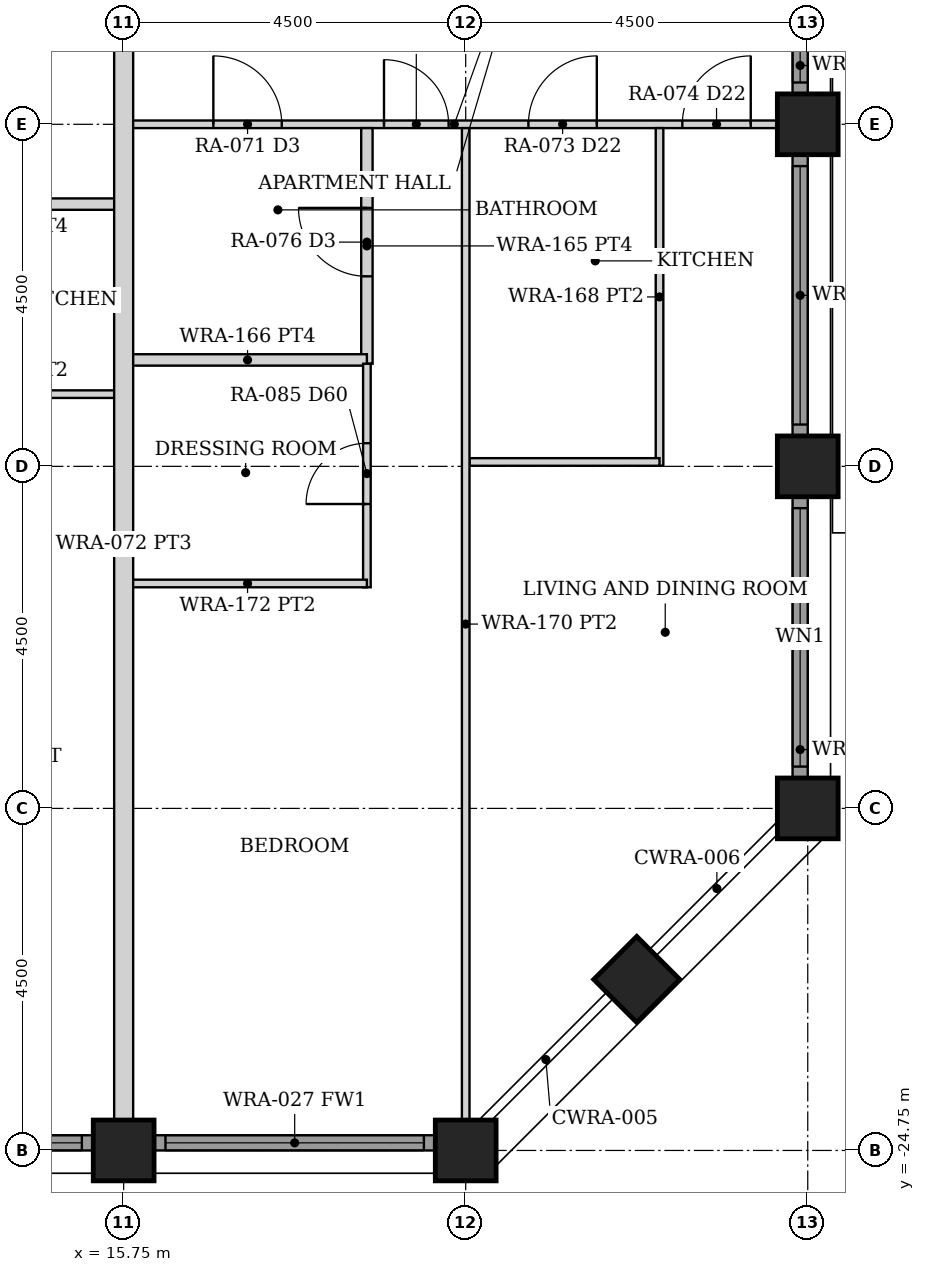
"""IFC4 building model, lengths in metres.
Left out: names, types, materials, properties, quantities, classifications, styles, units other than length and angle.
Written with IfcOpenShell. Run it as: python <this file> out.ifc"""

import sys

from ifc_helpers import new_model, si_unit, direction, frame, frame_2d, origin, origin_2d, place, context, subcontext, project, spatial, rectangle, hollow_rectangle, extrude, element, fill, save


model = new_model("IFC4")
c1 = context("Model", 3, precision=1e-05, world=origin(), true_north=direction((0.0, 1.0)))
c2 = subcontext(c1, "Body", "Model", "MODEL_VIEW")
j1 = project(units=[si_unit("LENGTHUNIT", "METRE"), si_unit("PLANEANGLEUNIT", "RADIAN")], contexts=[c1])
p1 = place(None, origin())
s1 = spatial("IfcSite", under=j1, at=p1, CompositionType="ELEMENT")
p2 = place(p1, origin())
s2 = spatial("IfcBuilding", under=s1, at=p2, CompositionType="ELEMENT")
p3 = place(p2, frame((0.0, 0.0, 26.5)))
s3 = spatial("IfcBuildingStorey", under=s2, at=p3, CompositionType="ELEMENT", Elevation=26.5)
for number, where, z_axis, x_axis in (
    (1, (24.75, -20.25, 0.0), (0.0, 0.0, 1.0), (1.0, 0.0, 0.0)),
    (2, (24.75, -15.75, 0.0), (0.0, 0.0, 1.0), (1.0, 0.0, 0.0)),
    (3, (24.75, -11.25, 0.0), (0.0, 0.0, 1.0), (1.0, 0.0, 0.0)),
    (4, (15.75, -24.75, 0.0), (0.0, 0.0, 1.0), (0.0, 1.0, 0.0)),
    (5, (20.25, -24.75, 0.0), (0.0, 0.0, 1.0), (0.0, 1.0, 0.0)),
    (6, (22.5, -22.5, 0.0), (0.0, 0.0, 1.0), (0.707, -0.707, 0.0)),
):
    element("IfcColumn", number, at=place(p3, frame(where, z_axis=z_axis, x_axis=x_axis)), inside=s3, PredefinedType="COLUMN", context=c2, shape_type="SweptSolid", body=[
        extrude(hollow_rectangle(XDim=0.8, YDim=0.8, WallThickness=0.08, at=origin_2d()), origin(), (0.0, 0.0, 1.0), 3.5),
    ])
p4 = place(p3, frame((11.655, -24.65, 0.0), z_axis=(0.0, 0.0, 1.0), x_axis=(1.0, 0.0, 0.0)))
e7 = element("IfcWall", 7, at=p4, inside=s3, PredefinedType="SOLIDWALL", context=c2, shape_type="SweptSolid", body=[
    extrude(rectangle(XDim=3.69, YDim=0.2, at=frame_2d((1.845, 0.0))), origin(), (0.0, 0.0, 1.0), 2.379),
])
p5 = place(p4, frame((0.145, 0.0, 0.3)))
e8 = element("IfcOpeningElement", 8, at=p5, cuts=e7, PredefinedType="OPENING", context=c2, shape_type="SweptSolid", body=[
    extrude(rectangle(XDim=3.4, YDim=1.929, at=frame_2d((1.7, 0.964))), frame((0.0, 0.11, 0.0), z_axis=(0.0, -1.0, 0.0), x_axis=(1.0, 0.0, 0.0)), (0.0, 0.0, 1.0), 0.22),
])
p6 = place(p3, frame((16.155, -24.65, 0.0), z_axis=(0.0, 0.0, 1.0), x_axis=(1.0, 0.0, 0.0)))
e9 = element("IfcWall", 9, at=p6, inside=s3, PredefinedType="SOLIDWALL", context=c2, shape_type="SweptSolid", body=[
    extrude(rectangle(XDim=3.69, YDim=0.2, at=frame_2d((1.845, 0.0))), origin(), (0.0, 0.0, 1.0), 2.379),
])
p7 = place(p6, frame((0.145, 0.0, 0.3)))
e10 = element("IfcOpeningElement", 10, at=p7, cuts=e9, PredefinedType="OPENING", context=c2, shape_type="SweptSolid", body=[
    extrude(rectangle(XDim=3.4, YDim=1.929, at=frame_2d((1.7, 0.964))), frame((0.0, 0.11, 0.0), z_axis=(0.0, -1.0, 0.0), x_axis=(1.0, 0.0, 0.0)), (0.0, 0.0, 1.0), 0.22),
])
p8 = place(p3, frame((24.65, -19.845, 0.0), z_axis=(0.0, 0.0, 1.0), x_axis=(0.0, 1.0, 0.0)))
e11 = element("IfcWall", 11, at=p8, inside=s3, PredefinedType="SOLIDWALL", context=c2, shape_type="SweptSolid", body=[
    extrude(rectangle(XDim=3.69, YDim=0.2, at=frame_2d((1.845, 0.0))), origin(), (0.0, 0.0, 1.0), 2.379),
])
p9 = place(p8, frame((0.145, 0.0, 0.3)))
e12 = element("IfcOpeningElement", 12, at=p9, cuts=e11, PredefinedType="OPENING", context=c2, shape_type="SweptSolid", body=[
    extrude(rectangle(XDim=3.4, YDim=1.929, at=frame_2d((1.7, 0.964))), frame((0.0, 0.11, 0.0), z_axis=(0.0, -1.0, 0.0), x_axis=(1.0, 0.0, 0.0)), (0.0, 0.0, 1.0), 0.22),
])
p10 = place(p3, frame((24.65, -15.345, 0.0), z_axis=(0.0, 0.0, 1.0), x_axis=(0.0, 1.0, 0.0)))
e13 = element("IfcWall", 13, at=p10, inside=s3, PredefinedType="SOLIDWALL", context=c2, shape_type="SweptSolid", body=[
    extrude(rectangle(XDim=3.69, YDim=0.2, at=frame_2d((1.845, 0.0))), origin(), (0.0, 0.0, 1.0), 2.379),
])
p11 = place(p10, frame((0.145, 0.0, 0.3)))
e14 = element("IfcOpeningElement", 14, at=p11, cuts=e13, PredefinedType="OPENING", context=c2, shape_type="SweptSolid", body=[
    extrude(rectangle(XDim=3.4, YDim=1.929, at=frame_2d((1.7, 0.964))), frame((0.0, 0.11, 0.0), z_axis=(0.0, -1.0, 0.0), x_axis=(1.0, 0.0, 0.0)), (0.0, 0.0, 1.0), 0.22),
])
p12 = place(p3, frame((24.65, -10.845, 0.0), z_axis=(0.0, 0.0, 1.0), x_axis=(0.0, 1.0, 0.0)))
e15 = element("IfcWall", 15, at=p12, inside=s3, PredefinedType="SOLIDWALL", context=c2, shape_type="SweptSolid", body=[
    extrude(rectangle(XDim=3.69, YDim=0.2, at=frame_2d((1.845, 0.0))), origin(), (0.0, 0.0, 1.0), 2.379),
])
p13 = place(p12, frame((0.145, 0.0, 0.3)))
e16 = element("IfcOpeningElement", 16, at=p13, cuts=e15, PredefinedType="OPENING", context=c2, shape_type="SweptSolid", body=[
    extrude(rectangle(XDim=3.4, YDim=1.929, at=frame_2d((1.7, 0.964))), frame((0.0, 0.11, 0.0), z_axis=(0.0, -1.0, 0.0), x_axis=(1.0, 0.0, 0.0)), (0.0, 0.0, 1.0), 0.22),
])
p14 = place(p3, frame((12.6, -12.3, 0.0), z_axis=(0.0, 0.0, 1.0), x_axis=(1.0, 0.0, 0.0)))
e17 = element("IfcWall", 17, at=p14, inside=s3, PredefinedType="PARTITIONING", context=c2, shape_type="SweptSolid", body=[
    extrude(rectangle(XDim=3.05, YDim=0.15, at=frame_2d((1.525, 0.0))), origin(), (0.0, 0.0, 1.0), 2.373),
])
p15 = place(p3, frame((12.6, -14.8, 0.0), z_axis=(0.0, 0.0, 1.0), x_axis=(1.0, 0.0, 0.0)))
e18 = element("IfcWall", 18, at=p15, inside=s3, PredefinedType="PARTITIONING", context=c2, shape_type="SweptSolid", body=[
    extrude(rectangle(XDim=3.05, YDim=0.1, at=frame_2d((1.525, 0.0))), origin(), (0.0, 0.0, 1.0), 2.373),
])
p16 = place(p3, frame((15.85, -11.25, 0.0), z_axis=(0.0, 0.0, 1.0), x_axis=(1.0, 0.0, 0.0)))
e19 = element("IfcWall", 19, at=p16, inside=s3, PredefinedType="PARTITIONING", context=c2, shape_type="SweptSolid", body=[
    extrude(rectangle(XDim=8.5, YDim=0.1, at=frame_2d((4.25, 0.0))), origin(), (0.0, 0.0, 1.0), 2.373),
])
p17 = place(p16, frame((5.225, 0.0, 0.0)))
e20 = element("IfcOpeningElement", 20, at=p17, cuts=e19, PredefinedType="OPENING", context=c2, shape_type="SweptSolid", body=[
    extrude(rectangle(XDim=0.9, YDim=2.1, at=frame_2d((0.45, 1.05))), frame((0.0, 0.06, 0.0), z_axis=(0.0, -1.0, 0.0), x_axis=(1.0, 0.0, 0.0)), (0.0, 0.0, 1.0), 0.12),
])
p18 = place(p16, frame((7.25, 0.0, 0.0)))
e21 = element("IfcOpeningElement", 21, at=p18, cuts=e19, PredefinedType="OPENING", context=c2, shape_type="SweptSolid", body=[
    extrude(rectangle(XDim=0.9, YDim=2.1, at=frame_2d((0.45, 1.05))), frame((0.0, 0.06, 0.0), z_axis=(0.0, -1.0, 0.0), x_axis=(1.0, 0.0, 0.0)), (0.0, 0.0, 1.0), 0.12),
])
p19 = place(p16, frame((3.325, 0.0, 0.0)))
e22 = element("IfcOpeningElement", 22, at=p19, cuts=e19, PredefinedType="OPENING", context=c2, shape_type="SweptSolid", body=[
    extrude(rectangle(XDim=0.85, YDim=2.1, at=frame_2d((0.425, 1.05))), frame((0.0, 0.06, 0.0), z_axis=(0.0, -1.0, 0.0), x_axis=(1.0, 0.0, 0.0)), (0.0, 0.0, 1.0), 0.12),
])
p20 = place(p16, frame((1.08, 0.0, 0.0)))
e23 = element("IfcOpeningElement", 23, at=p20, cuts=e19, PredefinedType="OPENING", context=c2, shape_type="SweptSolid", body=[
    extrude(rectangle(XDim=0.9, YDim=2.1, at=frame_2d((0.45, 1.05))), frame((0.0, 0.06, 0.0), z_axis=(0.0, -1.0, 0.0), x_axis=(1.0, 0.0, 0.0)), (0.0, 0.0, 1.0), 0.12),
])
p21 = place(p3, frame((22.8, -15.742, 0.0), z_axis=(0.0, 0.0, 1.0), x_axis=(0.0, 1.0, 0.0)))
e24 = element("IfcWall", 24, at=p21, inside=s3, PredefinedType="PARTITIONING", context=c2, shape_type="SweptSolid", body=[
    extrude(rectangle(XDim=4.442, YDim=0.1, at=frame_2d((2.221, 0.0))), origin(), (0.0, 0.0, 1.0), 2.373),
])
p22 = place(p3, frame((20.3, -15.692, 0.0), z_axis=(0.0, 0.0, 1.0), x_axis=(1.0, 0.0, 0.0)))
e25 = element("IfcWall", 25, at=p22, inside=s3, PredefinedType="PARTITIONING", context=c2, shape_type="SweptSolid", body=[
    extrude(rectangle(XDim=2.5, YDim=0.1, at=frame_2d((1.25, 0.0))), origin(), (0.0, 0.0, 1.0), 2.373),
])
p23 = place(p3, frame((20.25, -24.35, 0.0), z_axis=(0.0, 0.0, 1.0), x_axis=(0.0, 1.0, 0.0)))
e26 = element("IfcWall", 26, at=p23, inside=s3, PredefinedType="PARTITIONING", context=c2, shape_type="SweptSolid", body=[
    extrude(rectangle(XDim=13.05, YDim=0.1, at=frame_2d((6.525, 0.0))), origin(), (0.0, 0.0, 1.0), 2.373),
])
p24 = place(p3, frame((18.95, -14.4, 0.0), z_axis=(0.0, 0.0, 1.0), x_axis=(0.0, 1.0, 0.0)))
e27 = element("IfcWall", 27, at=p24, inside=s3, PredefinedType="PARTITIONING", context=c2, shape_type="SweptSolid", body=[
    extrude(rectangle(XDim=3.1, YDim=0.15, at=frame_2d((1.55, 0.0))), origin(), (0.0, 0.0, 1.0), 2.373),
])
p25 = place(p24, frame((1.15, 0.0, 0.0)))
e28 = element("IfcOpeningElement", 28, at=p25, cuts=e27, PredefinedType="OPENING", context=c2, shape_type="SweptSolid", body=[
    extrude(rectangle(XDim=0.9, YDim=2.1, at=frame_2d((0.45, 1.05))), frame((0.0, 0.085, 0.0), z_axis=(0.0, -1.0, 0.0), x_axis=(1.0, 0.0, 0.0)), (0.0, 0.0, 1.0), 0.17),
])
p26 = place(p3, frame((15.81, -14.35, 0.0), z_axis=(0.0, 0.0, 1.0), x_axis=(1.0, 0.0, 0.0)))
e29 = element("IfcWall", 29, at=p26, inside=s3, PredefinedType="PARTITIONING", context=c2, shape_type="SweptSolid", body=[
    extrude(rectangle(XDim=3.14, YDim=0.15, at=frame_2d((1.57, 0.0))), origin(), (0.0, 0.0, 1.0), 2.373),
])
p27 = place(p3, frame((18.95, -17.341, 0.0), z_axis=(0.0, 0.0, 1.0), x_axis=(0.0, 1.0, 0.0)))
e30 = element("IfcWall", 30, at=p27, inside=s3, PredefinedType="PARTITIONING", context=c2, shape_type="SweptSolid", body=[
    extrude(rectangle(XDim=2.941, YDim=0.1, at=frame_2d((1.47, 0.0))), origin(), (0.0, 0.0, 1.0), 2.373),
])
p28 = place(p27, frame((1.095, 0.0, 0.0)))
e31 = element("IfcOpeningElement", 31, at=p28, cuts=e30, PredefinedType="OPENING", context=c2, shape_type="SweptSolid", body=[
    extrude(rectangle(XDim=0.8, YDim=2.1, at=frame_2d((0.4, 1.05))), frame((0.0, 0.06, 0.0), z_axis=(0.0, -1.0, 0.0), x_axis=(1.0, 0.0, 0.0)), (0.0, 0.0, 1.0), 0.12),
])
p29 = place(p3, frame((15.81, -17.291, 0.0), z_axis=(0.0, 0.0, 1.0), x_axis=(1.0, 0.0, 0.0)))
e32 = element("IfcWall", 32, at=p29, inside=s3, PredefinedType="PARTITIONING", context=c2, shape_type="SweptSolid", body=[
    extrude(rectangle(XDim=3.14, YDim=0.1, at=frame_2d((1.57, 0.0))), origin(), (0.0, 0.0, 1.0), 2.373),
])
p30 = place(p3, frame((15.75, -24.35, 0.0), z_axis=(0.0, 0.0, 1.0), x_axis=(0.0, 1.0, 0.0)))
e33 = element("IfcWall", 33, at=p30, inside=s3, PredefinedType="PARTITIONING", context=c2, shape_type="SweptSolid", body=[
    extrude(rectangle(XDim=15.15, YDim=0.25, at=frame_2d((7.575, 0.0))), origin(), (0.0, 0.0, 1.0), 2.373),
])
p31 = place(p5, origin())
e34 = element("IfcWindow", 34, at=p31, inside=s3, PartitioningType="SINGLE_PANEL", PredefinedType="WINDOW", context=c2, shape_type="SweptSolid", body=[
    extrude(rectangle(XDim=3.4, YDim=1.929, at=frame_2d((1.7, 0.964))), frame((0.0, 0.03, 0.0), z_axis=(0.0, -1.0, 0.0), x_axis=(1.0, 0.0, 0.0)), (0.0, 0.0, 1.0), 0.06),
])
fill(e8, e34)
p32 = place(p7, origin())
e35 = element("IfcWindow", 35, at=p32, inside=s3, PartitioningType="SINGLE_PANEL", PredefinedType="WINDOW", context=c2, shape_type="SweptSolid", body=[
    extrude(rectangle(XDim=3.4, YDim=1.929, at=frame_2d((1.7, 0.964))), frame((0.0, 0.03, 0.0), z_axis=(0.0, -1.0, 0.0), x_axis=(1.0, 0.0, 0.0)), (0.0, 0.0, 1.0), 0.06),
])
fill(e10, e35)
p33 = place(p9, origin())
e36 = element("IfcWindow", 36, at=p33, inside=s3, PartitioningType="SINGLE_PANEL", PredefinedType="WINDOW", context=c2, shape_type="SweptSolid", body=[
    extrude(rectangle(XDim=3.4, YDim=1.929, at=frame_2d((1.7, 0.964))), frame((0.0, 0.03, 0.0), z_axis=(0.0, -1.0, 0.0), x_axis=(1.0, 0.0, 0.0)), (0.0, 0.0, 1.0), 0.06),
])
fill(e12, e36)
p34 = place(p11, origin())
e37 = element("IfcWindow", 37, at=p34, inside=s3, PartitioningType="SINGLE_PANEL", PredefinedType="WINDOW", context=c2, shape_type="SweptSolid", body=[
    extrude(rectangle(XDim=3.4, YDim=1.929, at=frame_2d((1.7, 0.964))), frame((0.0, 0.03, 0.0), z_axis=(0.0, -1.0, 0.0), x_axis=(1.0, 0.0, 0.0)), (0.0, 0.0, 1.0), 0.06),
])
fill(e14, e37)
p35 = place(p13, origin())
e38 = element("IfcWindow", 38, at=p35, inside=s3, PartitioningType="SINGLE_PANEL", PredefinedType="WINDOW", context=c2, shape_type="SweptSolid", body=[
    extrude(rectangle(XDim=3.4, YDim=1.929, at=frame_2d((1.7, 0.964))), frame((0.0, 0.03, 0.0), z_axis=(0.0, -1.0, 0.0), x_axis=(1.0, 0.0, 0.0)), (0.0, 0.0, 1.0), 0.06),
])
fill(e16, e38)
p36 = place(p17, origin())
e39 = element("IfcDoor", 39, at=p36, inside=s3, OperationType="SINGLE_SWING_RIGHT", PredefinedType="DOOR", context=c2, shape_type="SweptSolid", body=[
    extrude(rectangle(XDim=0.9, YDim=2.1, at=frame_2d((0.45, 1.05))), frame((0.0, 0.025, 0.0), z_axis=(0.0, -1.0, 0.0), x_axis=(1.0, 0.0, 0.0)), (0.0, 0.0, 1.0), 0.05),
])
fill(e20, e39)
p37 = place(p18, origin())
e40 = element("IfcDoor", 40, at=p37, inside=s3, OperationType="SINGLE_SWING_RIGHT", PredefinedType="DOOR", context=c2, shape_type="SweptSolid", body=[
    extrude(rectangle(XDim=0.9, YDim=2.1, at=frame_2d((0.45, 1.05))), frame((0.0, 0.025, 0.0), z_axis=(0.0, -1.0, 0.0), x_axis=(1.0, 0.0, 0.0)), (0.0, 0.0, 1.0), 0.05),
])
fill(e21, e40)
p38 = place(p19, origin())
e41 = element("IfcDoor", 41, at=p38, inside=s3, OperationType="SINGLE_SWING_LEFT", PredefinedType="DOOR", context=c2, shape_type="SweptSolid", body=[
    extrude(rectangle(XDim=0.85, YDim=2.1, at=frame_2d((0.425, 1.05))), frame((0.0, 0.025, 0.0), z_axis=(0.0, -1.0, 0.0), x_axis=(1.0, 0.0, 0.0)), (0.0, 0.0, 1.0), 0.05),
])
fill(e22, e41)
p39 = place(p25, origin())
e42 = element("IfcDoor", 42, at=p39, inside=s3, OperationType="SINGLE_SWING_RIGHT", PredefinedType="DOOR", context=c2, shape_type="SweptSolid", body=[
    extrude(rectangle(XDim=0.9, YDim=2.1, at=frame_2d((0.45, 1.05))), frame((0.0, 0.025, 0.0), z_axis=(0.0, -1.0, 0.0), x_axis=(1.0, 0.0, 0.0)), (0.0, 0.0, 1.0), 0.05),
])
fill(e28, e42)
p40 = place(p20, origin())
e43 = element("IfcDoor", 43, at=p40, inside=s3, OperationType="SINGLE_SWING_LEFT", PredefinedType="DOOR", context=c2, shape_type="SweptSolid", body=[
    extrude(rectangle(XDim=0.9, YDim=2.1, at=frame_2d((0.45, 1.05))), frame((0.0, 0.025, 0.0), z_axis=(0.0, -1.0, 0.0), x_axis=(1.0, 0.0, 0.0)), (0.0, 0.0, 1.0), 0.05),
])
fill(e23, e43)
p41 = place(p28, origin())
e44 = element("IfcDoor", 44, at=p41, inside=s3, OperationType="SINGLE_SWING_LEFT", PredefinedType="DOOR", context=c2, shape_type="SweptSolid", body=[
    extrude(rectangle(XDim=0.8, YDim=2.1, at=frame_2d((0.4, 1.05))), frame((0.0, 0.025, 0.0), z_axis=(0.0, -1.0, 0.0), x_axis=(1.0, 0.0, 0.0)), (0.0, 0.0, 1.0), 0.05),
])
fill(e31, e44)
save(model, sys.argv[1])
